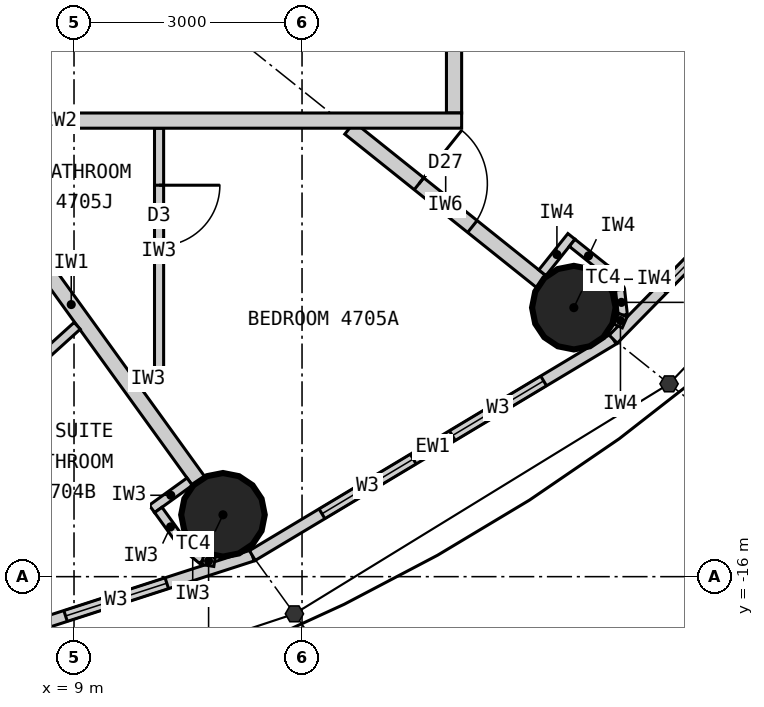
"""IFC4 building model, lengths in metres.
Left out: names, types, materials, properties, quantities, classifications, styles, units other than length and angle.
Written with IfcOpenShell. Run it as: python <this file> out.ifc"""

import sys

from ifc_helpers import new_model, si_unit, direction, frame, frame_2d, origin, origin_2d, place, context, subcontext, project, spatial, rectangle, circle, extrude, element, fill, save


model = new_model("IFC4")
c1 = context("Model", 3, precision=1e-05, world=origin(), true_north=direction((0.0, 1.0)))
c2 = subcontext(c1, "Body", "Model", "MODEL_VIEW")
j1 = project(units=[si_unit("LENGTHUNIT", "METRE"), si_unit("PLANEANGLEUNIT", "RADIAN")], contexts=[c1])
p1 = place(None, origin())
s1 = spatial("IfcSite", under=j1, at=p1, CompositionType="ELEMENT")
p2 = place(p1, origin())
s2 = spatial("IfcBuilding", under=s1, at=p2, CompositionType="ELEMENT")
p3 = place(p2, frame((0.0, 0.0, 176.4)))
s3 = spatial("IfcBuildingStorey", under=s2, at=p3, CompositionType="ELEMENT", Elevation=176.4)
for number, where, z_axis, x_axis in (
    (1, (10.96, -15.186, 0.0), (0.0, 0.0, 1.0), (1.0, 0.0, 0.0)),
    (2, (15.576, -12.461, 0.0), (0.0, 0.0, 1.0), (1.0, 0.0, 0.0)),
):
    element("IfcColumn", number, at=place(p3, frame(where, z_axis=z_axis, x_axis=x_axis)), inside=s3, PredefinedType="COLUMN", context=c2, shape_type="SweptSolid", body=[
        extrude(circle(Radius=0.55, at=origin_2d()), origin(), (0.0, 0.0, 1.0), 3.3),
    ])
p4 = place(p3, frame((5.86, -17.497, 0.0), z_axis=(0.0, 0.0, 1.0), x_axis=(0.951432482129, 0.307857486429, 0.0)))
e3 = element("IfcWall", 3, at=p4, inside=s3, PredefinedType="ELEMENTEDWALL", context=c2, shape_type="SweptSolid", body=[
    extrude(rectangle(XDim=5.766, YDim=0.15, at=frame_2d((2.883, 0.0))), origin(), (0.0, 0.0, 1.0), 3.12),
])
p5 = place(p4, frame((1.183, 0.0, 0.9)))
e4 = element("IfcOpeningElement", 4, at=p5, cuts=e3, PredefinedType="OPENING", context=c2, shape_type="SweptSolid", body=[
    extrude(rectangle(XDim=1.4, YDim=1.9, at=frame_2d((0.7, 0.95))), frame((0.0, 0.085, 0.0), z_axis=(0.0, -1.0, 0.0), x_axis=(1.0, 0.0, 0.0)), (0.0, 0.0, 1.0), 0.17),
])
p6 = place(p4, frame((3.183, 0.0, 0.9)))
e5 = element("IfcOpeningElement", 5, at=p6, cuts=e3, PredefinedType="OPENING", context=c2, shape_type="SweptSolid", body=[
    extrude(rectangle(XDim=1.4, YDim=1.9, at=frame_2d((0.7, 0.95))), frame((0.0, 0.085, 0.0), z_axis=(0.0, -1.0, 0.0), x_axis=(1.0, 0.0, 0.0)), (0.0, 0.0, 1.0), 0.17),
])
p7 = place(p3, frame((11.346, -15.722, 0.0), z_axis=(0.0, 0.0, 1.0), x_axis=(0.857695199231, 0.514158482587, 0.0)))
e6 = element("IfcWall", 6, at=p7, inside=s3, PredefinedType="ELEMENTEDWALL", context=c2, shape_type="SweptSolid", body=[
    extrude(rectangle(XDim=5.536, YDim=0.15, at=frame_2d((2.768, 0.0))), origin(), (0.0, 0.0, 1.0), 3.12),
])
p8 = place(p7, frame((1.068, 0.0, 0.9)))
e7 = element("IfcOpeningElement", 7, at=p8, cuts=e6, PredefinedType="OPENING", context=c2, shape_type="SweptSolid", body=[
    extrude(rectangle(XDim=1.4, YDim=1.9, at=frame_2d((0.7, 0.95))), frame((0.0, 0.085, 0.0), z_axis=(0.0, -1.0, 0.0), x_axis=(1.0, 0.0, 0.0)), (0.0, 0.0, 1.0), 0.17),
])
p9 = place(p7, frame((3.068, 0.0, 0.9)))
e8 = element("IfcOpeningElement", 8, at=p9, cuts=e6, PredefinedType="OPENING", context=c2, shape_type="SweptSolid", body=[
    extrude(rectangle(XDim=1.4, YDim=1.9, at=frame_2d((0.7, 0.95))), frame((0.0, 0.085, 0.0), z_axis=(0.0, -1.0, 0.0), x_axis=(1.0, 0.0, 0.0)), (0.0, 0.0, 1.0), 0.17),
])
p10 = place(p3, frame((16.095, -12.876, 0.0), z_axis=(0.0, 0.0, 1.0), x_axis=(0.700727467776, 0.71342905457, 0.0)))
e9 = element("IfcWall", 9, at=p10, inside=s3, PredefinedType="ELEMENTEDWALL", context=c2, shape_type="SweptSolid", body=[
    extrude(rectangle(XDim=5.247, YDim=0.15, at=frame_2d((2.624, 0.0))), origin(), (0.0, 0.0, 1.0), 3.12),
])
p11 = place(p10, frame((0.924, 0.0, 0.9)))
e10 = element("IfcOpeningElement", 10, at=p11, cuts=e9, PredefinedType="OPENING", context=c2, shape_type="SweptSolid", body=[
    extrude(rectangle(XDim=1.4, YDim=1.9, at=frame_2d((0.7, 0.95))), frame((0.0, 0.085, 0.0), z_axis=(0.0, -1.0, 0.0), x_axis=(1.0, 0.0, 0.0)), (0.0, 0.0, 1.0), 0.17),
])
p12 = place(p10, frame((2.924, 0.0, 0.9)))
e11 = element("IfcOpeningElement", 11, at=p12, cuts=e9, PredefinedType="OPENING", context=c2, shape_type="SweptSolid", body=[
    extrude(rectangle(XDim=1.4, YDim=1.9, at=frame_2d((0.7, 0.95))), frame((0.0, 0.085, 0.0), z_axis=(0.0, -1.0, 0.0), x_axis=(1.0, 0.0, 0.0)), (0.0, 0.0, 1.0), 0.17),
])
p13 = place(p3, frame((14.0, -9.9, 0.0), z_axis=(0.0, 0.0, 1.0), x_axis=(0.0, 1.0, 0.0)))
e12 = element("IfcWall", 12, at=p13, inside=s3, PredefinedType="PARTITIONING", context=c2, shape_type="SweptSolid", body=[
    extrude(rectangle(XDim=19.8, YDim=0.2, at=frame_2d((9.9, 0.0))), origin(), (0.0, 0.0, 1.0), 3.12),
])
p14 = place(p13, frame((4.268, 0.0, 0.0)))
e13 = element("IfcOpeningElement", 13, at=p14, cuts=e12, PredefinedType="OPENING", context=c2, shape_type="SweptSolid", body=[
    extrude(rectangle(XDim=1.0, YDim=2.2, at=frame_2d((0.5, 1.1))), frame((0.0, 0.11, 0.0), z_axis=(0.0, -1.0, 0.0), x_axis=(1.0, 0.0, 0.0)), (0.0, 0.0, 1.0), 0.22),
])
p15 = place(p13, frame((7.177, 0.0, 0.0)))
e14 = element("IfcOpeningElement", 14, at=p15, cuts=e12, PredefinedType="OPENING", context=c2, shape_type="SweptSolid", body=[
    extrude(rectangle(XDim=1.0, YDim=2.2, at=frame_2d((0.5, 1.1))), frame((0.0, 0.11, 0.0), z_axis=(0.0, -1.0, 0.0), x_axis=(1.0, 0.0, 0.0)), (0.0, 0.0, 1.0), 0.22),
])
p16 = place(p13, frame((17.701, 0.0, 0.0)))
e15 = element("IfcOpeningElement", 15, at=p16, cuts=e12, PredefinedType="OPENING", context=c2, shape_type="SweptSolid", body=[
    extrude(rectangle(XDim=1.0, YDim=2.2, at=frame_2d((0.5, 1.1))), frame((0.0, 0.11, 0.0), z_axis=(0.0, -1.0, 0.0), x_axis=(1.0, 0.0, 0.0)), (0.0, 0.0, 1.0), 0.22),
])
p17 = place(p3, frame((7.289, -10.1, 0.0), z_axis=(0.0, 0.0, 1.0), x_axis=(0.585222595178, -0.810872686735, 0.0)))
e16 = element("IfcWall", 16, at=p17, inside=s3, PredefinedType="PARTITIONING", context=c2, shape_type="SweptSolid", body=[
    extrude(rectangle(XDim=5.722, YDim=0.2, at=frame_2d((2.861, 0.0))), origin(), (0.0, 0.0, 1.0), 2.42),
])
p18 = place(p3, frame((12.625, -10.1, 0.0), z_axis=(0.0, 0.0, 1.0), x_axis=(0.780876185034, -0.624685827954, 0.0)))
e17 = element("IfcWall", 17, at=p18, inside=s3, PredefinedType="PARTITIONING", context=c2, shape_type="SweptSolid", body=[
    extrude(rectangle(XDim=3.229, YDim=0.2, at=frame_2d((1.615, 0.0))), origin(), (0.0, 0.0, 1.0), 2.42),
])
p19 = place(p18, frame((1.17, 0.0, 0.0)))
e18 = element("IfcOpeningElement", 18, at=p19, cuts=e17, PredefinedType="OPENING", context=c2, shape_type="SweptSolid", body=[
    extrude(rectangle(XDim=0.9, YDim=2.1, at=frame_2d((0.45, 1.05))), frame((0.0, 0.11, 0.0), z_axis=(0.0, -1.0, 0.0), x_axis=(1.0, 0.0, 0.0)), (0.0, 0.0, 1.0), 0.22),
])
p20 = place(p3, frame((9.042, -12.699, 0.0), z_axis=(0.0, 0.0, 1.0), x_axis=(-0.741100257539, -0.671394376112, 0.0)))
e19 = element("IfcWall", 19, at=p20, inside=s3, PredefinedType="PARTITIONING", context=c2, shape_type="SweptSolid", body=[
    extrude(rectangle(XDim=2.312, YDim=0.12, at=frame_2d((1.156, 0.0))), origin(), (0.0, 0.0, 1.0), 3.12),
])
p21 = place(p20, frame((0.756, 0.0, 0.0)))
e20 = element("IfcOpeningElement", 20, at=p21, cuts=e19, PredefinedType="OPENING", context=c2, shape_type="SweptSolid", body=[
    extrude(rectangle(XDim=0.8, YDim=2.1, at=frame_2d((0.4, 1.05))), frame((0.0, 0.07, 0.0), z_axis=(0.0, -1.0, 0.0), x_axis=(1.0, 0.0, 0.0)), (0.0, 0.0, 1.0), 0.14),
])
p22 = place(p3, frame((10.522, -14.75, 0.0), z_axis=(0.0, 0.0, 1.0), x_axis=(-0.811057588427, -0.584966313777, 0.0)))
e21 = element("IfcWall", 21, at=p22, inside=s3, PredefinedType="PARTITIONING", context=c2, shape_type="SweptSolid", body=[
    extrude(rectangle(XDim=0.612, YDim=0.12, at=frame_2d((0.306, 0.0))), origin(), (0.0, 0.0, 1.0), 3.12),
])
p23 = place(p3, frame((10.109, -15.122, 0.0), z_axis=(0.0, 0.0, 1.0), x_axis=(0.585344718358, -0.810784534072, 0.0)))
e22 = element("IfcWall", 22, at=p23, inside=s3, PredefinedType="PARTITIONING", context=c2, shape_type="SweptSolid", body=[
    extrude(rectangle(XDim=0.55, YDim=0.12, at=frame_2d((0.275, 0.0))), origin(), (0.0, 0.0, 1.0), 3.12),
])
p24 = place(p3, frame((10.431, -15.568, 0.0), z_axis=(0.0, 0.0, 1.0), x_axis=(0.77505137267, -0.631898227345, 0.0)))
e23 = element("IfcWall", 23, at=p24, inside=s3, PredefinedType="PARTITIONING", context=c2, shape_type="SweptSolid", body=[
    extrude(rectangle(XDim=0.338, YDim=0.12, at=frame_2d((0.169, 0.0))), origin(), (0.0, 0.0, 1.0), 3.12),
])
p25 = place(p3, frame((10.693, -15.781, 0.0), z_axis=(0.0, 0.0, 1.0), x_axis=(0.987256785332, -0.159135287777, 0.0)))
e24 = element("IfcWall", 24, at=p25, inside=s3, PredefinedType="PARTITIONING", context=c2, shape_type="SweptSolid", body=[
    extrude(rectangle(XDim=0.158, YDim=0.12, at=frame_2d((0.079, 0.0))), origin(), (0.0, 0.0, 1.0), 3.12),
])
p26 = place(p3, frame((9.771, -13.4, 0.0), z_axis=(0.0, 0.0, 1.0), x_axis=(1.0, 0.0, 0.0)))
e25 = element("IfcWall", 25, at=p26, inside=s3, PredefinedType="PARTITIONING", context=c2, shape_type="SweptSolid", body=[
    extrude(rectangle(XDim=0.408, YDim=0.12, at=frame_2d((0.204, 0.0))), origin(), (0.0, 0.0, 1.0), 3.12),
])
p27 = place(p3, frame((10.119, -10.1, 0.0), z_axis=(0.0, 0.0, 1.0), x_axis=(0.0, -1.0, 0.0)))
e26 = element("IfcWall", 26, at=p27, inside=s3, PredefinedType="PARTITIONING", context=c2, shape_type="SweptSolid", body=[
    extrude(rectangle(XDim=3.24, YDim=0.12, at=frame_2d((1.62, 0.0))), origin(), (0.0, 0.0, 1.0), 3.12),
])
p28 = place(p27, frame((0.75, 0.0, 0.0)))
e27 = element("IfcOpeningElement", 27, at=p28, cuts=e26, PredefinedType="OPENING", context=c2, shape_type="SweptSolid", body=[
    extrude(rectangle(XDim=0.8, YDim=2.1, at=frame_2d((0.4, 1.05))), frame((0.0, 0.07, 0.0), z_axis=(0.0, -1.0, 0.0), x_axis=(1.0, 0.0, 0.0)), (0.0, 0.0, 1.0), 0.14),
])
p29 = place(p3, frame((14.1, -10.0, 0.0), z_axis=(0.0, 0.0, 1.0), x_axis=(-1.0, 0.0, 0.0)))
e28 = element("IfcWall", 28, at=p29, inside=s3, PredefinedType="PARTITIONING", context=c2, shape_type="SweptSolid", body=[
    extrude(rectangle(XDim=10.582, YDim=0.2, at=frame_2d((5.291, 0.0))), origin(), (0.0, 0.0, 1.0), 3.12),
])
p30 = place(p3, frame((15.162, -12.002, 0.0), z_axis=(0.0, 0.0, 1.0), x_axis=(0.624597762427, 0.780946627607, 0.0)))
e29 = element("IfcWall", 29, at=p30, inside=s3, PredefinedType="PARTITIONING", context=c2, shape_type="SweptSolid", body=[
    extrude(rectangle(XDim=0.612, YDim=0.12, at=frame_2d((0.306, 0.0))), origin(), (0.0, 0.0, 1.0), 3.12),
])
p31 = place(p3, frame((15.554, -11.608, 0.0), z_axis=(0.0, 0.0, 1.0), x_axis=(0.780695577787, -0.624911525597, 0.0)))
e30 = element("IfcWall", 30, at=p31, inside=s3, PredefinedType="PARTITIONING", context=c2, shape_type="SweptSolid", body=[
    extrude(rectangle(XDim=0.55, YDim=0.12, at=frame_2d((0.275, 0.0))), origin(), (0.0, 0.0, 1.0), 3.12),
])
p32 = place(p3, frame((15.984, -11.952, 0.0), z_axis=(0.0, 0.0, 1.0), x_axis=(0.592335221171, -0.805691619517, 0.0)))
e31 = element("IfcWall", 31, at=p32, inside=s3, PredefinedType="PARTITIONING", context=c2, shape_type="SweptSolid", body=[
    extrude(rectangle(XDim=0.338, YDim=0.12, at=frame_2d((0.169, 0.0))), origin(), (0.0, 0.0, 1.0), 3.12),
])
p33 = place(p3, frame((16.184, -12.224, 0.0), z_axis=(0.0, 0.0, 1.0), x_axis=(0.110669692975, -0.993857242795, 0.0)))
e32 = element("IfcWall", 32, at=p33, inside=s3, PredefinedType="PARTITIONING", context=c2, shape_type="SweptSolid", body=[
    extrude(rectangle(XDim=0.337, YDim=0.12, at=frame_2d((0.169, 0.0))), origin(), (0.0, 0.0, 1.0), 3.12),
])
p34 = place(p3, frame((16.221, -12.559, 0.0), z_axis=(0.0, 0.0, 1.0), x_axis=(-0.401064416249, -0.916049853457, 0.0)))
e33 = element("IfcWall", 33, at=p34, inside=s3, PredefinedType="PARTITIONING", context=c2, shape_type="SweptSolid", body=[
    extrude(rectangle(XDim=0.156, YDim=0.12, at=frame_2d((0.078, 0.0))), origin(), (0.0, 0.0, 1.0), 3.12),
])
p35 = place(p6, origin())
e34 = element("IfcWindow", 34, at=p35, inside=s3, PartitioningType="SINGLE_PANEL", PredefinedType="WINDOW", context=c2, shape_type="SweptSolid", body=[
    extrude(rectangle(XDim=1.4, YDim=1.9, at=frame_2d((0.7, 0.95))), frame((0.0, 0.03, 0.0), z_axis=(0.0, -1.0, 0.0), x_axis=(1.0, 0.0, 0.0)), (0.0, 0.0, 1.0), 0.06),
])
fill(e5, e34)
p36 = place(p8, origin())
e35 = element("IfcWindow", 35, at=p36, inside=s3, PartitioningType="SINGLE_PANEL", PredefinedType="WINDOW", context=c2, shape_type="SweptSolid", body=[
    extrude(rectangle(XDim=1.4, YDim=1.9, at=frame_2d((0.7, 0.95))), frame((0.0, 0.03, 0.0), z_axis=(0.0, -1.0, 0.0), x_axis=(1.0, 0.0, 0.0)), (0.0, 0.0, 1.0), 0.06),
])
fill(e7, e35)
p37 = place(p9, origin())
e36 = element("IfcWindow", 36, at=p37, inside=s3, PartitioningType="SINGLE_PANEL", PredefinedType="WINDOW", context=c2, shape_type="SweptSolid", body=[
    extrude(rectangle(XDim=1.4, YDim=1.9, at=frame_2d((0.7, 0.95))), frame((0.0, 0.03, 0.0), z_axis=(0.0, -1.0, 0.0), x_axis=(1.0, 0.0, 0.0)), (0.0, 0.0, 1.0), 0.06),
])
fill(e8, e36)
p38 = place(p11, origin())
e37 = element("IfcWindow", 37, at=p38, inside=s3, PartitioningType="SINGLE_PANEL", PredefinedType="WINDOW", context=c2, shape_type="SweptSolid", body=[
    extrude(rectangle(XDim=1.4, YDim=1.9, at=frame_2d((0.7, 0.95))), frame((0.0, 0.03, 0.0), z_axis=(0.0, -1.0, 0.0), x_axis=(1.0, 0.0, 0.0)), (0.0, 0.0, 1.0), 0.06),
])
fill(e10, e37)
p39 = place(p28, origin())
e38 = element("IfcDoor", 38, at=p39, inside=s3, OperationType="SINGLE_SWING_LEFT", PredefinedType="DOOR", context=c2, shape_type="SweptSolid", body=[
    extrude(rectangle(XDim=0.8, YDim=2.1, at=frame_2d((0.4, 1.05))), frame((0.0, 0.025, 0.0), z_axis=(0.0, -1.0, 0.0), x_axis=(1.0, 0.0, 0.0)), (0.0, 0.0, 1.0), 0.05),
])
fill(e27, e38)
p40 = place(p19, origin())
e39 = element("IfcDoor", 39, at=p40, inside=s3, OperationType="SINGLE_SWING_LEFT", PredefinedType="DOOR", context=c2, shape_type="SweptSolid", body=[
    extrude(rectangle(XDim=0.9, YDim=2.1, at=frame_2d((0.45, 1.05))), frame((0.0, 0.025, 0.0), z_axis=(0.0, -1.0, 0.0), x_axis=(1.0, 0.0, 0.0)), (0.0, 0.0, 1.0), 0.05),
])
fill(e18, e39)
save(model, sys.argv[1])
